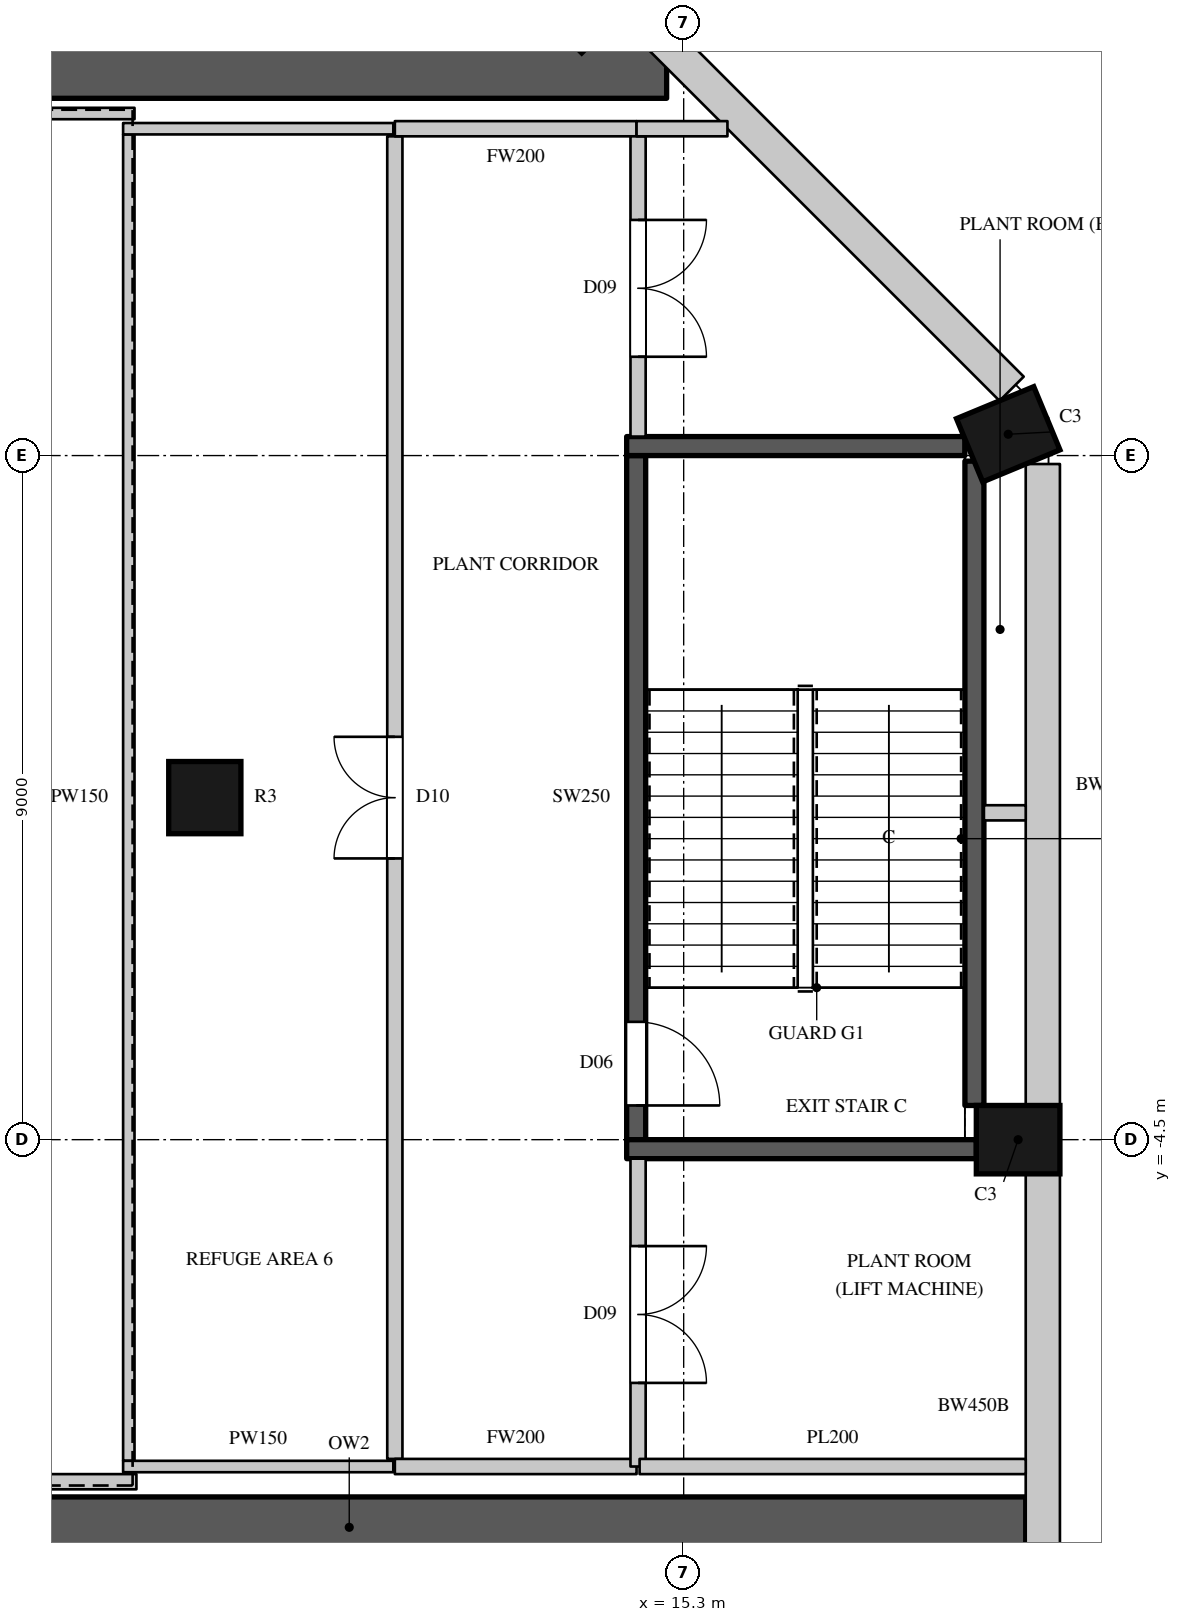
"""IFC4 building model, lengths in metres.
Left out: names, types, materials, properties, quantities, classifications, styles, units other than length and angle.
Written with IfcOpenShell. Run it as: python <this file> out.ifc"""

import sys

from ifc_helpers import new_model, si_unit, direction, frame, frame_2d, origin, origin_2d, place, context, subcontext, project, spatial, rectangle, circle, extrude, element, fill, save


model = new_model("IFC4")
c1 = context("Model", 3, precision=1e-05, world=origin(), true_north=direction((0.0, 1.0)))
c2 = subcontext(c1, "Body", "Model", "MODEL_VIEW")
j1 = project(units=[si_unit("LENGTHUNIT", "METRE"), si_unit("PLANEANGLEUNIT", "RADIAN")], contexts=[c1])
p1 = place(None, origin())
s1 = spatial("IfcSite", under=j1, at=p1, CompositionType="ELEMENT")
p2 = place(p1, origin())
s2 = spatial("IfcBuilding", under=s1, at=p2, CompositionType="ELEMENT")
p3 = place(p2, frame((0.0, 0.0, 238.4)))
s3 = spatial("IfcBuildingStorey", under=s2, at=p3, CompositionType="ELEMENT", Elevation=238.4)
for number, where, z_axis, x_axis in (
    (1, (19.7, -4.5, 0.0), (0.0, 0.0, 1.0), (0.0, 1.0, 0.0)),
    (2, (19.57, 4.78, 0.0), (0.0, 0.0, 1.0), (-0.383, 0.924, 0.0)),
    (3, (14.029, 10.505, 0.0), (0.0, 0.0, 1.0), (-0.707, 0.707, 0.0)),
):
    element("IfcColumn", number, at=place(p3, frame(where, z_axis=z_axis, x_axis=x_axis)), inside=s3, PredefinedType="COLUMN", context=c2, shape_type="SweptSolid", body=[
        extrude(rectangle(XDim=0.9, YDim=1.1, at=origin_2d()), origin(), (0.0, 0.0, 1.0), 5.0),
    ])
p4 = place(p3, frame((9.0, 0.0, 0.0), z_axis=(0.0, 0.0, 1.0), x_axis=(1.0, 0.0, 0.0)))
e4 = element("IfcColumn", 4, at=p4, inside=s3, PredefinedType="COLUMN", context=c2, shape_type="SweptSolid", body=[
    extrude(circle(Radius=0.475, at=origin_2d()), origin(), (0.0, 0.0, 1.0), 5.0),
])
p5 = place(p3, frame((2.0, -9.6, 0.0), z_axis=(0.0, 0.0, 1.0), x_axis=(1.0, 0.0, 0.0)))
e5 = element("IfcWall", 5, at=p5, inside=s3, PredefinedType="SOLIDWALL", context=c2, shape_type="SweptSolid", body=[
    extrude(rectangle(XDim=17.8, YDim=0.8, at=frame_2d((8.9, 0.0))), origin(), (0.0, 0.0, 1.0), 4.7),
])
p6 = place(p3, frame((2.0, 9.6, 0.0), z_axis=(0.0, 0.0, 1.0), x_axis=(1.0, 0.0, 0.0)))
e6 = element("IfcWall", 6, at=p6, inside=s3, PredefinedType="SOLIDWALL", context=c2, shape_type="SweptSolid", body=[
    extrude(rectangle(XDim=13.076, YDim=0.8, at=frame_2d((6.538, 0.0))), origin(), (0.0, 0.0, 1.0), 4.7),
])
p7 = place(p3, frame((20.025, -11.064, 0.0), z_axis=(0.0, 0.0, 1.0), x_axis=(0.0, 1.0, 0.0)))
e7 = element("IfcWall", 7, at=p7, inside=s3, PredefinedType="SOLIDWALL", context=c2, shape_type="SweptSolid", body=[
    extrude(rectangle(XDim=6.114, YDim=0.45, at=frame_2d((3.057, 0.0))), origin(), (0.0, 0.0, 1.0), 4.7),
])
p8 = place(p3, frame((20.025, -4.05, 0.0), z_axis=(0.0, 0.0, 1.0), x_axis=(0.0, 1.0, 0.0)))
e8 = element("IfcWall", 8, at=p8, inside=s3, PredefinedType="SOLIDWALL", context=c2, shape_type="SweptSolid", body=[
    extrude(rectangle(XDim=8.439, YDim=0.45, at=frame_2d((4.219, 0.0))), origin(), (0.0, 0.0, 1.0), 4.7),
])
p9 = place(p3, frame((19.615, 5.379, 0.0), z_axis=(0.0, 0.0, 1.0), x_axis=(-0.707089646058, 0.7071239159, 0.0)))
e9 = element("IfcWall", 9, at=p9, inside=s3, PredefinedType="SOLIDWALL", context=c2, shape_type="SweptSolid", body=[
    extrude(rectangle(XDim=7.124, YDim=0.45, at=frame_2d((3.562, 0.0))), origin(), (0.0, 0.0, 1.0), 4.7),
])
p10 = place(p3, frame((11.5, -8.7, 0.0), z_axis=(0.0, 0.0, 1.0), x_axis=(0.0, 1.0, 0.0)))
e10 = element("IfcWall", 10, at=p10, inside=s3, PredefinedType="PARTITIONING", context=c2, shape_type="SweptSolid", body=[
    extrude(rectangle(XDim=17.4, YDim=0.2, at=frame_2d((8.7, 0.0))), origin(), (0.0, 0.0, 1.0), 4.7),
])
p11 = place(p10, frame((7.9, 0.0, 0.0)))
e11 = element("IfcOpeningElement", 11, at=p11, cuts=e10, PredefinedType="OPENING", context=c2, shape_type="SweptSolid", body=[
    extrude(rectangle(XDim=1.6, YDim=2.4, at=frame_2d((0.8, 1.2))), frame((0.0, 0.11, 0.0), z_axis=(0.0, -1.0, 0.0), x_axis=(1.0, 0.0, 0.0)), (0.0, 0.0, 1.0), 0.22),
])
for number, where, z_axis, x_axis in (
    (12, (11.5, -8.8, 0.0), (0.0, 0.0, 1.0), (1.0, 0.0, 0.0)),
    (13, (11.5, 8.8, 0.0), (0.0, 0.0, 1.0), (1.0, 0.0, 0.0)),
):
    element("IfcWall", number, at=place(p3, frame(where, z_axis=z_axis, x_axis=x_axis)), inside=s3, PredefinedType="PARTITIONING", context=c2, shape_type="SweptSolid", body=[
        extrude(rectangle(XDim=3.18, YDim=0.2, at=frame_2d((1.59, 0.0))), origin(), (0.0, 0.0, 1.0), 4.7),
    ])
p12 = place(p3, frame((-6.075, 9.0, 0.0), z_axis=(0.0, 0.0, 1.0), x_axis=(1.0, 0.0, 0.0)))
e14 = element("IfcWall", 14, at=p12, inside=s3, PredefinedType="PARTITIONING", context=c2, shape_type="SweptSolid", body=[
    extrude(rectangle(XDim=14.15, YDim=0.15, at=frame_2d((7.075, 0.0))), origin(), (0.0, 0.0, 1.0), 4.7),
])
p13 = place(p3, frame((8.0, -8.725, 0.0), z_axis=(0.0, 0.0, 1.0), x_axis=(0.0, 1.0, 0.0)))
e15 = element("IfcWall", 15, at=p13, inside=s3, PredefinedType="PARTITIONING", context=c2, shape_type="SweptSolid", body=[
    extrude(rectangle(XDim=17.45, YDim=0.15, at=frame_2d((8.725, 0.0))), origin(), (0.0, 0.0, 1.0), 4.7),
])
for number, where, z_axis, x_axis in (
    (16, (7.925, -8.8, 0.0), (0.0, 0.0, 1.0), (1.0, 0.0, 0.0)),
    (17, (7.925, 8.8, 0.0), (0.0, 0.0, 1.0), (1.0, 0.0, 0.0)),
):
    element("IfcWall", number, at=place(p3, frame(where, z_axis=z_axis, x_axis=x_axis)), inside=s3, PredefinedType="PARTITIONING", context=c2, shape_type="SweptSolid", body=[
        extrude(rectangle(XDim=3.555, YDim=0.15, at=frame_2d((1.777, 0.0))), origin(), (0.0, 0.0, 1.0), 4.7),
    ])
p14 = place(p3, frame((-6.1, -9.0, 0.0), z_axis=(0.0, 0.0, 1.0), x_axis=(1.0, 0.0, 0.0)))
e18 = element("IfcWall", 18, at=p14, inside=s3, PredefinedType="PARTITIONING", context=c2, shape_type="SweptSolid", body=[
    extrude(rectangle(XDim=14.2, YDim=0.2, at=frame_2d((7.1, 0.0))), origin(), (0.0, 0.0, 1.0), 4.7),
])
p15 = place(p3, frame((14.7, -8.8, 0.0), z_axis=(0.0, 0.0, 1.0), x_axis=(0.0, 1.0, 0.0)))
e19 = element("IfcWall", 19, at=p15, inside=s3, PredefinedType="PARTITIONING", context=c2, shape_type="SweptSolid", body=[
    extrude(rectangle(XDim=4.05, YDim=0.2, at=frame_2d((2.025, 0.0))), origin(), (0.0, 0.0, 1.0), 4.7),
])
p16 = place(p15, frame((1.1, 0.0, 0.0)))
e20 = element("IfcOpeningElement", 20, at=p16, cuts=e19, PredefinedType="OPENING", context=c2, shape_type="SweptSolid", body=[
    extrude(rectangle(XDim=1.8, YDim=2.4, at=frame_2d((0.9, 1.2))), frame((0.0, 0.11, 0.0), z_axis=(0.0, -1.0, 0.0), x_axis=(1.0, 0.0, 0.0)), (0.0, 0.0, 1.0), 0.22),
])
p17 = place(p3, frame((14.7, 4.75, 0.0), z_axis=(0.0, 0.0, 1.0), x_axis=(0.0, 1.0, 0.0)))
e21 = element("IfcWall", 21, at=p17, inside=s3, PredefinedType="PARTITIONING", context=c2, shape_type="SweptSolid", body=[
    extrude(rectangle(XDim=3.95, YDim=0.2, at=frame_2d((1.975, 0.0))), origin(), (0.0, 0.0, 1.0), 4.7),
])
p18 = place(p17, frame((1.05, 0.0, 0.0)))
e22 = element("IfcOpeningElement", 22, at=p18, cuts=e21, PredefinedType="OPENING", context=c2, shape_type="SweptSolid", body=[
    extrude(rectangle(XDim=1.8, YDim=2.4, at=frame_2d((0.9, 1.2))), frame((0.0, 0.11, 0.0), z_axis=(0.0, -1.0, 0.0), x_axis=(1.0, 0.0, 0.0)), (0.0, 0.0, 1.0), 0.22),
])
p19 = place(p3, frame((14.72, -8.8, 0.0), z_axis=(0.0, 0.0, 1.0), x_axis=(1.0, 0.0, 0.0)))
e23 = element("IfcWall", 23, at=p19, inside=s3, PredefinedType="PARTITIONING", context=c2, shape_type="SweptSolid", body=[
    extrude(rectangle(XDim=5.08, YDim=0.2, at=frame_2d((2.54, 0.0))), origin(), (0.0, 0.0, 1.0), 4.7),
])
p20 = place(p3, frame((14.68, 8.8, 0.0), z_axis=(0.0, 0.0, 1.0), x_axis=(1.0, 0.0, 0.0)))
e24 = element("IfcWall", 24, at=p20, inside=s3, PredefinedType="PARTITIONING", context=c2, shape_type="SweptSolid", body=[
    extrude(rectangle(XDim=1.196, YDim=0.2, at=frame_2d((0.598, 0.0))), origin(), (0.0, 0.0, 1.0), 4.7),
])
p21 = place(p3, frame((19.25, -0.2, 0.0), z_axis=(0.0, 0.0, 1.0), x_axis=(1.0, 0.0, 0.0)))
e25 = element("IfcWall", 25, at=p21, inside=s3, PredefinedType="PARTITIONING", context=c2, shape_type="SweptSolid", body=[
    extrude(rectangle(XDim=0.55, YDim=0.2, at=frame_2d((0.275, 0.0))), origin(), (0.0, 0.0, 1.0), 4.7),
])
p22 = place(p3, frame((14.675, -4.5, 0.0), z_axis=(0.0, 0.0, 1.0), x_axis=(0.0, 1.0, 0.0)))
e26 = element("IfcWall", 26, at=p22, inside=s3, PredefinedType="SHEAR", context=c2, shape_type="SweptSolid", body=[
    extrude(rectangle(XDim=9.0, YDim=0.25, at=frame_2d((4.5, 0.0))), origin(), (0.0, 0.0, 1.0), 4.7),
])
p23 = place(p22, frame((0.45, 0.0, 0.0)))
e27 = element("IfcOpeningElement", 27, at=p23, cuts=e26, PredefinedType="OPENING", context=c2, shape_type="SweptSolid", body=[
    extrude(rectangle(XDim=1.1, YDim=2.2, at=frame_2d((0.55, 1.1))), frame((0.0, 0.135, 0.0), z_axis=(0.0, -1.0, 0.0), x_axis=(1.0, 0.0, 0.0)), (0.0, 0.0, 1.0), 0.27),
])
p24 = place(p3, frame((14.55, -4.625, 0.0), z_axis=(0.0, 0.0, 1.0), x_axis=(1.0, 0.0, 0.0)))
e28 = element("IfcWall", 28, at=p24, inside=s3, PredefinedType="SHEAR", context=c2, shape_type="SweptSolid", body=[
    extrude(rectangle(XDim=4.6, YDim=0.25, at=frame_2d((2.3, 0.0))), origin(), (0.0, 0.0, 1.0), 4.7),
])
p25 = place(p3, frame((14.55, 4.625, 0.0), z_axis=(0.0, 0.0, 1.0), x_axis=(1.0, 0.0, 0.0)))
e29 = element("IfcWall", 29, at=p25, inside=s3, PredefinedType="SHEAR", context=c2, shape_type="SweptSolid", body=[
    extrude(rectangle(XDim=4.449, YDim=0.25, at=frame_2d((2.224, 0.0))), origin(), (0.0, 0.0, 1.0), 4.7),
])
p26 = place(p3, frame((19.125, -4.05, 0.0), z_axis=(0.0, 0.0, 1.0), x_axis=(0.0, 1.0, 0.0)))
e30 = element("IfcWall", 30, at=p26, inside=s3, PredefinedType="SHEAR", context=c2, shape_type="SweptSolid", body=[
    extrude(rectangle(XDim=8.477, YDim=0.25, at=frame_2d((4.238, 0.0))), origin(), (0.0, 0.0, 1.0), 4.7),
])
p27 = place(p11, origin())
e31 = element("IfcDoor", 31, at=p27, inside=s3, OperationType="DOUBLE_DOOR_SINGLE_SWING", PredefinedType="DOOR", context=c2, shape_type="SweptSolid", body=[
    extrude(rectangle(XDim=1.6, YDim=2.4, at=frame_2d((0.8, 1.2))), frame((0.0, 0.025, 0.0), z_axis=(0.0, -1.0, 0.0), x_axis=(1.0, 0.0, 0.0)), (0.0, 0.0, 1.0), 0.05),
])
fill(e11, e31)
p28 = place(p18, origin())
e32 = element("IfcDoor", 32, at=p28, inside=s3, OperationType="DOUBLE_DOOR_SINGLE_SWING", PredefinedType="DOOR", context=c2, shape_type="SweptSolid", body=[
    extrude(rectangle(XDim=1.8, YDim=2.4, at=frame_2d((0.9, 1.2))), frame((0.0, 0.025, 0.0), z_axis=(0.0, -1.0, 0.0), x_axis=(1.0, 0.0, 0.0)), (0.0, 0.0, 1.0), 0.05),
])
fill(e22, e32)
p29 = place(p16, origin())
e33 = element("IfcDoor", 33, at=p29, inside=s3, OperationType="DOUBLE_DOOR_SINGLE_SWING", PredefinedType="DOOR", context=c2, shape_type="SweptSolid", body=[
    extrude(rectangle(XDim=1.8, YDim=2.4, at=frame_2d((0.9, 1.2))), frame((0.0, 0.025, 0.0), z_axis=(0.0, -1.0, 0.0), x_axis=(1.0, 0.0, 0.0)), (0.0, 0.0, 1.0), 0.05),
])
fill(e20, e33)
p30 = place(p23, origin())
e34 = element("IfcDoor", 34, at=p30, inside=s3, OperationType="SINGLE_SWING_RIGHT", PredefinedType="DOOR", context=c2, shape_type="SweptSolid", body=[
    extrude(rectangle(XDim=1.1, YDim=2.2, at=frame_2d((0.55, 1.1))), frame((0.0, 0.025, 0.0), z_axis=(0.0, -1.0, 0.0), x_axis=(1.0, 0.0, 0.0)), (0.0, 0.0, 1.0), 0.05),
])
fill(e27, e34)
save(model, sys.argv[1])
